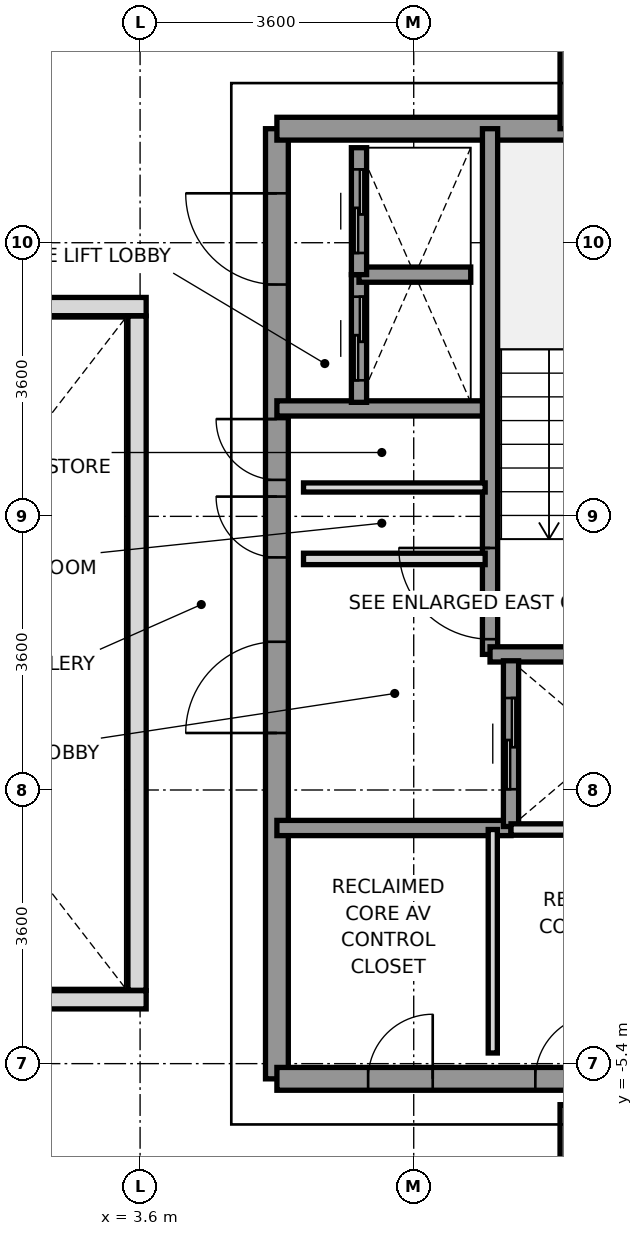
"""IFC4 building model, lengths in metres.
Left out: names, types, materials, properties, quantities, classifications, styles, units other than length and angle.
Written with IfcOpenShell. Run it as: python <this file> out.ifc"""

import sys

from ifc_helpers import new_model, si_unit, direction, frame, frame_2d, origin, place, context, subcontext, project, spatial, rectangle, extrude, source, transform, mapped, element, fill, save


model = new_model("IFC4")
c1 = context("Model", 3, precision=1e-05, world=origin(), true_north=direction((0.0, 1.0)))
c2 = subcontext(c1, "Body", "Model", "MODEL_VIEW")
j1 = project(units=[si_unit("LENGTHUNIT", "METRE"), si_unit("PLANEANGLEUNIT", "RADIAN")], contexts=[c1])
p1 = place(None, origin())
s1 = spatial("IfcSite", under=j1, at=p1, CompositionType="ELEMENT")
p2 = place(p1, origin())
s2 = spatial("IfcBuilding", under=s1, at=p2, CompositionType="ELEMENT")
p3 = place(p2, frame((0.0, 0.0, 258.8)))
s3 = spatial("IfcBuildingStorey", under=s2, at=p3, CompositionType="ELEMENT", Elevation=258.8)
p4 = place(p3, frame((5.4, -5.6, 0.0), z_axis=(0.0, 0.0, 1.0), x_axis=(0.0, 1.0, 0.0)))
e1 = element("IfcWall", 1, at=p4, inside=s3, PredefinedType="SHEAR", context=c2, shape_type="SweptSolid", body=[
    extrude(rectangle(XDim=12.5, YDim=0.3, at=frame_2d((6.25, 0.0))), origin(), (0.0, 0.0, 1.0), 3.01),
])
p5 = place(p4, frame((4.55, 0.0, 0.0)))
e2 = element("IfcOpeningElement", 2, at=p5, cuts=e1, PredefinedType="OPENING", context=c2, shape_type="SweptSolid", body=[
    extrude(rectangle(XDim=1.2, YDim=2.2, at=frame_2d((0.6, 1.1))), frame((0.0, 0.16, 0.0), z_axis=(0.0, -1.0, 0.0), x_axis=(1.0, 0.0, 0.0)), (0.0, 0.0, 1.0), 0.32),
])
p6 = place(p4, frame((10.45, 0.0, 0.0)))
e3 = element("IfcOpeningElement", 3, at=p6, cuts=e1, PredefinedType="OPENING", context=c2, shape_type="SweptSolid", body=[
    extrude(rectangle(XDim=1.2, YDim=2.2, at=frame_2d((0.6, 1.1))), frame((0.0, 0.16, 0.0), z_axis=(0.0, -1.0, 0.0), x_axis=(1.0, 0.0, 0.0)), (0.0, 0.0, 1.0), 0.32),
])
p7 = place(p4, frame((6.86, 0.0, 0.0)))
e4 = element("IfcOpeningElement", 4, at=p7, cuts=e1, PredefinedType="OPENING", context=c2, shape_type="SweptSolid", body=[
    extrude(rectangle(XDim=0.8, YDim=2.1, at=frame_2d((0.4, 1.05))), frame((0.0, 0.16, 0.0), z_axis=(0.0, -1.0, 0.0), x_axis=(1.0, 0.0, 0.0)), (0.0, 0.0, 1.0), 0.32),
])
p8 = place(p4, frame((7.88, 0.0, 0.0)))
e5 = element("IfcOpeningElement", 5, at=p8, cuts=e1, PredefinedType="OPENING", context=c2, shape_type="SweptSolid", body=[
    extrude(rectangle(XDim=0.8, YDim=2.1, at=frame_2d((0.4, 1.05))), frame((0.0, 0.16, 0.0), z_axis=(0.0, -1.0, 0.0), x_axis=(1.0, 0.0, 0.0)), (0.0, 0.0, 1.0), 0.32),
])
p9 = place(p3, frame((5.4, 6.9, 0.0), z_axis=(0.0, 0.0, 1.0), x_axis=(1.0, 0.0, 0.0)))
e6 = element("IfcWall", 6, at=p9, inside=s3, PredefinedType="SHEAR", context=c2, shape_type="SweptSolid", body=[
    extrude(rectangle(XDim=6.95, YDim=0.3, at=frame_2d((3.475, 0.0))), origin(), (0.0, 0.0, 1.0), 3.01),
])
p10 = place(p3, frame((5.4, -5.6, 0.0), z_axis=(0.0, 0.0, 1.0), x_axis=(1.0, 0.0, 0.0)))
e7 = element("IfcWall", 7, at=p10, inside=s3, PredefinedType="SHEAR", context=c2, shape_type="SweptSolid", body=[
    extrude(rectangle(XDim=6.95, YDim=0.3, at=frame_2d((3.475, 0.0))), origin(), (0.0, 0.0, 1.0), 3.01),
])
p11 = place(p10, frame((5.75, 0.0, 0.0)))
e8 = element("IfcOpeningElement", 8, at=p11, cuts=e7, PredefinedType="OPENING", context=c2, shape_type="SweptSolid", body=[
    extrude(rectangle(XDim=0.8, YDim=2.1, at=frame_2d((0.4, 1.05))), frame((0.0, 0.16, 0.0), z_axis=(0.0, -1.0, 0.0), x_axis=(1.0, 0.0, 0.0)), (0.0, 0.0, 1.0), 0.32),
])
p12 = place(p10, frame((1.2, 0.0, 0.0)))
e9 = element("IfcOpeningElement", 9, at=p12, cuts=e7, PredefinedType="OPENING", context=c2, shape_type="SweptSolid", body=[
    extrude(rectangle(XDim=0.85, YDim=2.1, at=frame_2d((0.425, 1.05))), frame((0.0, 0.16, 0.0), z_axis=(0.0, -1.0, 0.0), x_axis=(1.0, 0.0, 0.0)), (0.0, 0.0, 1.0), 0.32),
])
p13 = place(p10, frame((3.4, 0.0, 0.0)))
e10 = element("IfcOpeningElement", 10, at=p13, cuts=e7, PredefinedType="OPENING", context=c2, shape_type="SweptSolid", body=[
    extrude(rectangle(XDim=0.85, YDim=2.1, at=frame_2d((0.425, 1.05))), frame((0.0, 0.16, 0.0), z_axis=(0.0, -1.0, 0.0), x_axis=(1.0, 0.0, 0.0)), (0.0, 0.0, 1.0), 0.32),
])
p14 = place(p3, frame((5.4, 3.22, 0.0), z_axis=(0.0, 0.0, 1.0), x_axis=(1.0, 0.0, 0.0)))
e11 = element("IfcWall", 11, at=p14, inside=s3, PredefinedType="SOLIDWALL", context=c2, shape_type="SweptSolid", body=[
    extrude(rectangle(XDim=2.78, YDim=0.2, at=frame_2d((1.39, 0.0))), origin(), (0.0, 0.0, 1.0), 3.01),
])
p15 = place(p3, frame((5.4, -2.3, 0.0), z_axis=(0.0, 0.0, 1.0), x_axis=(1.0, 0.0, 0.0)))
e12 = element("IfcWall", 12, at=p15, inside=s3, PredefinedType="SOLIDWALL", context=c2, shape_type="SweptSolid", body=[
    extrude(rectangle(XDim=3.08, YDim=0.2, at=frame_2d((1.54, 0.0))), origin(), (0.0, 0.0, 1.0), 3.01),
])
p16 = place(p3, frame((8.204, -0.016, 0.0), z_axis=(0.0, 0.0, 1.0), x_axis=(0.0, 1.0, 0.0)))
e13 = element("IfcWall", 13, at=p16, inside=s3, PredefinedType="SOLIDWALL", context=c2, shape_type="SweptSolid", body=[
    extrude(rectangle(XDim=6.916, YDim=0.2, at=frame_2d((3.458, 0.0))), origin(), (0.0, 0.0, 1.0), 3.01),
])
p17 = place(p16, frame((0.2, 0.0, 0.0)))
e14 = element("IfcOpeningElement", 14, at=p17, cuts=e13, PredefinedType="OPENING", context=c2, shape_type="SweptSolid", body=[
    extrude(rectangle(XDim=1.2, YDim=2.2, at=frame_2d((0.6, 1.1))), frame((0.0, 0.11, 0.0), z_axis=(0.0, -1.0, 0.0), x_axis=(1.0, 0.0, 0.0)), (0.0, 0.0, 1.0), 0.22),
])
p18 = place(p3, frame((8.204, -0.016, 0.0), z_axis=(0.0, 0.0, 1.0), x_axis=(1.0, 0.0, 0.0)))
e15 = element("IfcWall", 15, at=p18, inside=s3, PredefinedType="SOLIDWALL", context=c2, shape_type="SweptSolid", body=[
    extrude(rectangle(XDim=3.152, YDim=0.2, at=frame_2d((1.576, 0.0))), origin(), (0.0, 0.0, 1.0), 3.01),
])
p19 = place(p3, frame((8.48, -2.28, 0.0), z_axis=(0.0, 0.0, 1.0), x_axis=(0.0, 1.0, 0.0)))
e16 = element("IfcWall", 16, at=p19, inside=s3, PredefinedType="SOLIDWALL", context=c2, shape_type="SweptSolid", body=[
    extrude(rectangle(XDim=2.18, YDim=0.2, at=frame_2d((1.09, 0.0))), origin(), (0.0, 0.0, 1.0), 3.01),
])
p20 = place(p19, frame((0.49, 0.0, 0.0)))
e17 = element("IfcOpeningElement", 17, at=p20, cuts=e16, PredefinedType="OPENING", context=c2, shape_type="SweptSolid", body=[
    extrude(rectangle(XDim=1.2, YDim=2.2, at=frame_2d((0.6, 1.1))), frame((0.0, 0.11, 0.0), z_axis=(0.0, -1.0, 0.0), x_axis=(1.0, 0.0, 0.0)), (0.0, 0.0, 1.0), 0.22),
])
p21 = place(p3, frame((6.48, 3.3, 0.0), z_axis=(0.0, 0.0, 1.0), x_axis=(0.0, 1.0, 0.0)))
e18 = element("IfcWall", 18, at=p21, inside=s3, PredefinedType="SOLIDWALL", context=c2, shape_type="SweptSolid", body=[
    extrude(rectangle(XDim=1.68, YDim=0.2, at=frame_2d((0.84, 0.0))), origin(), (0.0, 0.0, 1.0), 3.01),
])
p22 = place(p21, frame((0.29, 0.0, 0.0)))
e19 = element("IfcOpeningElement", 19, at=p22, cuts=e18, PredefinedType="OPENING", context=c2, shape_type="SweptSolid", body=[
    extrude(rectangle(XDim=1.1, YDim=2.2, at=frame_2d((0.55, 1.1))), frame((0.0, 0.11, 0.0), z_axis=(0.0, -1.0, 0.0), x_axis=(1.0, 0.0, 0.0)), (0.0, 0.0, 1.0), 0.22),
])
p23 = place(p3, frame((6.48, 4.98, 0.0), z_axis=(0.0, 0.0, 1.0), x_axis=(1.0, 0.0, 0.0)))
e20 = element("IfcWall", 20, at=p23, inside=s3, PredefinedType="SOLIDWALL", context=c2, shape_type="SweptSolid", body=[
    extrude(rectangle(XDim=1.47, YDim=0.2, at=frame_2d((0.735, 0.0))), origin(), (0.0, 0.0, 1.0), 3.01),
])
p24 = place(p3, frame((6.48, 4.98, 0.0), z_axis=(0.0, 0.0, 1.0), x_axis=(0.0, 1.0, 0.0)))
e21 = element("IfcWall", 21, at=p24, inside=s3, PredefinedType="SOLIDWALL", context=c2, shape_type="SweptSolid", body=[
    extrude(rectangle(XDim=1.67, YDim=0.2, at=frame_2d((0.835, 0.0))), origin(), (0.0, 0.0, 1.0), 3.01),
])
p25 = place(p24, frame((0.285, 0.0, 0.0)))
e22 = element("IfcOpeningElement", 22, at=p25, cuts=e21, PredefinedType="OPENING", context=c2, shape_type="SweptSolid", body=[
    extrude(rectangle(XDim=1.1, YDim=2.2, at=frame_2d((0.55, 1.1))), frame((0.0, 0.11, 0.0), z_axis=(0.0, -1.0, 0.0), x_axis=(1.0, 0.0, 0.0)), (0.0, 0.0, 1.0), 0.22),
])
p26 = place(p3, frame((5.75, 1.24, 0.0), z_axis=(0.0, 0.0, 1.0), x_axis=(1.0, 0.0, 0.0)))
e23 = element("IfcWall", 23, at=p26, inside=s3, PredefinedType="PARTITIONING", context=c2, shape_type="SweptSolid", body=[
    extrude(rectangle(XDim=2.39, YDim=0.15, at=frame_2d((1.195, 0.0))), origin(), (0.0, 0.0, 1.0), 3.01),
])
p27 = place(p3, frame((5.75, 2.18, 0.0), z_axis=(0.0, 0.0, 1.0), x_axis=(1.0, 0.0, 0.0)))
e24 = element("IfcWall", 24, at=p27, inside=s3, PredefinedType="PARTITIONING", context=c2, shape_type="SweptSolid", body=[
    extrude(rectangle(XDim=2.39, YDim=0.12, at=frame_2d((1.195, 0.0))), origin(), (0.0, 0.0, 1.0), 3.01),
])
p28 = place(p3, frame((8.24, -5.26, 0.0), z_axis=(0.0, 0.0, 1.0), x_axis=(0.0, 1.0, 0.0)))
e25 = element("IfcWall", 25, at=p28, inside=s3, PredefinedType="PARTITIONING", context=c2, shape_type="SweptSolid", body=[
    extrude(rectangle(XDim=2.94, YDim=0.12, at=frame_2d((1.47, 0.0))), origin(), (0.0, 0.0, 1.0), 3.01),
])
p29 = place(p3, frame((8.48, -2.32, 0.0), z_axis=(0.0, 0.0, 1.0), x_axis=(1.0, 0.0, 0.0)))
e26 = element("IfcWall", 26, at=p29, inside=s3, PredefinedType="PARTITIONING", context=c2, shape_type="SweptSolid", body=[
    extrude(rectangle(XDim=2.44, YDim=0.15, at=frame_2d((1.22, 0.0))), origin(), (0.0, 0.0, 1.0), 3.01),
])
p30 = place(p3, frame((9.2, 6.9, 0.0), z_axis=(0.0, 0.0, 1.0), x_axis=(0.0, 1.0, 0.0)))
e27 = element("IfcWall", 27, at=p30, inside=s3, PredefinedType="PARTITIONING", context=c2, shape_type="SweptSolid", body=[
    extrude(rectangle(XDim=3.38, YDim=0.15, at=frame_2d((1.69, 0.0))), origin(), (0.0, 0.0, 1.0), 2.61),
])
p31 = place(p3, frame((9.2, -10.28, 0.0), z_axis=(0.0, 0.0, 1.0), x_axis=(0.0, 1.0, 0.0)))
e28 = element("IfcWall", 28, at=p31, inside=s3, PredefinedType="PARTITIONING", context=c2, shape_type="SweptSolid", body=[
    extrude(rectangle(XDim=4.34, YDim=0.15, at=frame_2d((2.17, 0.0))), origin(), (0.0, 0.0, 1.0), 2.61),
])
for number, where, z_axis, x_axis in (
    (29, (-3.68, -4.56, 0.0), (0.0, 0.0, 1.0), (1.0, 0.0, 0.0)),
    (30, (-3.68, 4.56, 0.0), (0.0, 0.0, 1.0), (1.0, 0.0, 0.0)),
):
    element("IfcWall", number, at=place(p3, frame(where, z_axis=z_axis, x_axis=x_axis)), inside=s3, PredefinedType="PARAPET", context=c2, shape_type="SweptSolid", body=[
        extrude(rectangle(XDim=7.36, YDim=0.24, at=frame_2d((3.68, 0.0))), origin(), (0.0, 0.0, 1.0), 1.15),
    ])
p32 = place(p3, frame((3.56, -4.435, 0.0), z_axis=(0.0, 0.0, 1.0), x_axis=(0.0, 1.0, 0.0)))
e31 = element("IfcWall", 31, at=p32, inside=s3, PredefinedType="PARAPET", context=c2, shape_type="SweptSolid", body=[
    extrude(rectangle(XDim=8.87, YDim=0.24, at=frame_2d((4.435, 0.0))), origin(), (0.0, 0.0, 1.0), 1.15),
])
m1 = source(origin(), c2, "Body", "SweptSolid", [
    extrude(rectangle(XDim=1.2, YDim=2.2, at=frame_2d((0.6, 1.1))), frame((0.0, 0.025, 0.0), z_axis=(0.0, -1.0, 0.0), x_axis=(1.0, 0.0, 0.0)), (0.0, 0.0, 1.0), 0.05),
])
p33 = place(p17, origin())
e32 = element("IfcDoor", 32, at=p33, inside=s3, OperationType="SINGLE_SWING_RIGHT", PredefinedType="DOOR", context=c2, shape_type="MappedRepresentation", body=[
    mapped(m1, transform((0.0, 0.0, 0.0), x_axis=(1.0, 0.0, 0.0), y_axis=(0.0, 1.0, 0.0), z_axis=(0.0, 0.0, 1.0), scale=1.0)),
])
fill(e14, e32)
p34 = place(p5, origin())
e33 = element("IfcDoor", 33, at=p34, inside=s3, OperationType="SINGLE_SWING_LEFT", PredefinedType="DOOR", context=c2, shape_type="MappedRepresentation", body=[
    mapped(m1, transform((0.0, 0.0, 0.0), x_axis=(1.0, 0.0, 0.0), y_axis=(0.0, 1.0, 0.0), z_axis=(0.0, 0.0, 1.0), scale=1.0)),
])
fill(e2, e33)
p35 = place(p6, origin())
e34 = element("IfcDoor", 34, at=p35, inside=s3, OperationType="SINGLE_SWING_RIGHT", PredefinedType="DOOR", context=c2, shape_type="MappedRepresentation", body=[
    mapped(m1, transform((0.0, 0.0, 0.0), x_axis=(1.0, 0.0, 0.0), y_axis=(0.0, 1.0, 0.0), z_axis=(0.0, 0.0, 1.0), scale=1.0)),
])
fill(e3, e34)
m2 = source(origin(), c2, "Body", "SweptSolid", [
    extrude(rectangle(XDim=0.8, YDim=2.1, at=frame_2d((0.4, 1.05))), frame((0.0, 0.025, 0.0), z_axis=(0.0, -1.0, 0.0), x_axis=(1.0, 0.0, 0.0)), (0.0, 0.0, 1.0), 0.05),
])
p36 = place(p7, origin())
e35 = element("IfcDoor", 35, at=p36, inside=s3, OperationType="SINGLE_SWING_RIGHT", PredefinedType="DOOR", context=c2, shape_type="MappedRepresentation", body=[
    mapped(m2, transform((0.0, 0.0, 0.0), x_axis=(1.0, 0.0, 0.0), y_axis=(0.0, 1.0, 0.0), z_axis=(0.0, 0.0, 1.0), scale=1.0)),
])
fill(e4, e35)
p37 = place(p8, origin())
e36 = element("IfcDoor", 36, at=p37, inside=s3, OperationType="SINGLE_SWING_RIGHT", PredefinedType="DOOR", context=c2, shape_type="MappedRepresentation", body=[
    mapped(m2, transform((0.0, 0.0, 0.0), x_axis=(1.0, 0.0, 0.0), y_axis=(0.0, 1.0, 0.0), z_axis=(0.0, 0.0, 1.0), scale=1.0)),
])
fill(e5, e36)
m3 = source(origin(), c2, "Body", "SweptSolid", [
    extrude(rectangle(XDim=0.85, YDim=2.1, at=frame_2d((0.425, 1.05))), frame((0.0, 0.025, 0.0), z_axis=(0.0, -1.0, 0.0), x_axis=(1.0, 0.0, 0.0)), (0.0, 0.0, 1.0), 0.05),
])
p38 = place(p12, origin())
e37 = element("IfcDoor", 37, at=p38, inside=s3, OperationType="SINGLE_SWING_RIGHT", PredefinedType="DOOR", context=c2, shape_type="MappedRepresentation", body=[
    mapped(m3, transform((0.0, 0.0, 0.0), x_axis=(1.0, 0.0, 0.0), y_axis=(0.0, 1.0, 0.0), z_axis=(0.0, 0.0, 1.0), scale=1.0)),
])
fill(e9, e37)
p39 = place(p13, origin())
e38 = element("IfcDoor", 38, at=p39, inside=s3, OperationType="SINGLE_SWING_RIGHT", PredefinedType="DOOR", context=c2, shape_type="MappedRepresentation", body=[
    mapped(m3, transform((0.0, 0.0, 0.0), x_axis=(1.0, 0.0, 0.0), y_axis=(0.0, 1.0, 0.0), z_axis=(0.0, 0.0, 1.0), scale=1.0)),
])
fill(e10, e38)
p40 = place(p20, origin())
e39 = element("IfcDoor", 39, at=p40, inside=s3, OperationType="SLIDING_TO_RIGHT", PredefinedType="DOOR", context=c2, shape_type="MappedRepresentation", body=[
    mapped(m1, transform((0.0, 0.0, 0.0), x_axis=(1.0, 0.0, 0.0), y_axis=(0.0, 1.0, 0.0), z_axis=(0.0, 0.0, 1.0), scale=1.0)),
])
fill(e17, e39)
m4 = source(origin(), c2, "Body", "SweptSolid", [
    extrude(rectangle(XDim=1.1, YDim=2.2, at=frame_2d((0.55, 1.1))), frame((0.0, 0.025, 0.0), z_axis=(0.0, -1.0, 0.0), x_axis=(1.0, 0.0, 0.0)), (0.0, 0.0, 1.0), 0.05),
])
p41 = place(p22, origin())
e40 = element("IfcDoor", 40, at=p41, inside=s3, OperationType="SLIDING_TO_LEFT", PredefinedType="DOOR", context=c2, shape_type="MappedRepresentation", body=[
    mapped(m4, transform((0.0, 0.0, 0.0), x_axis=(1.0, 0.0, 0.0), y_axis=(0.0, 1.0, 0.0), z_axis=(0.0, 0.0, 1.0), scale=1.0)),
])
fill(e19, e40)
p42 = place(p25, origin())
e41 = element("IfcDoor", 41, at=p42, inside=s3, OperationType="SLIDING_TO_LEFT", PredefinedType="DOOR", context=c2, shape_type="MappedRepresentation", body=[
    mapped(m4, transform((0.0, 0.0, 0.0), x_axis=(1.0, 0.0, 0.0), y_axis=(0.0, 1.0, 0.0), z_axis=(0.0, 0.0, 1.0), scale=1.0)),
])
fill(e22, e41)
save(model, sys.argv[1])
